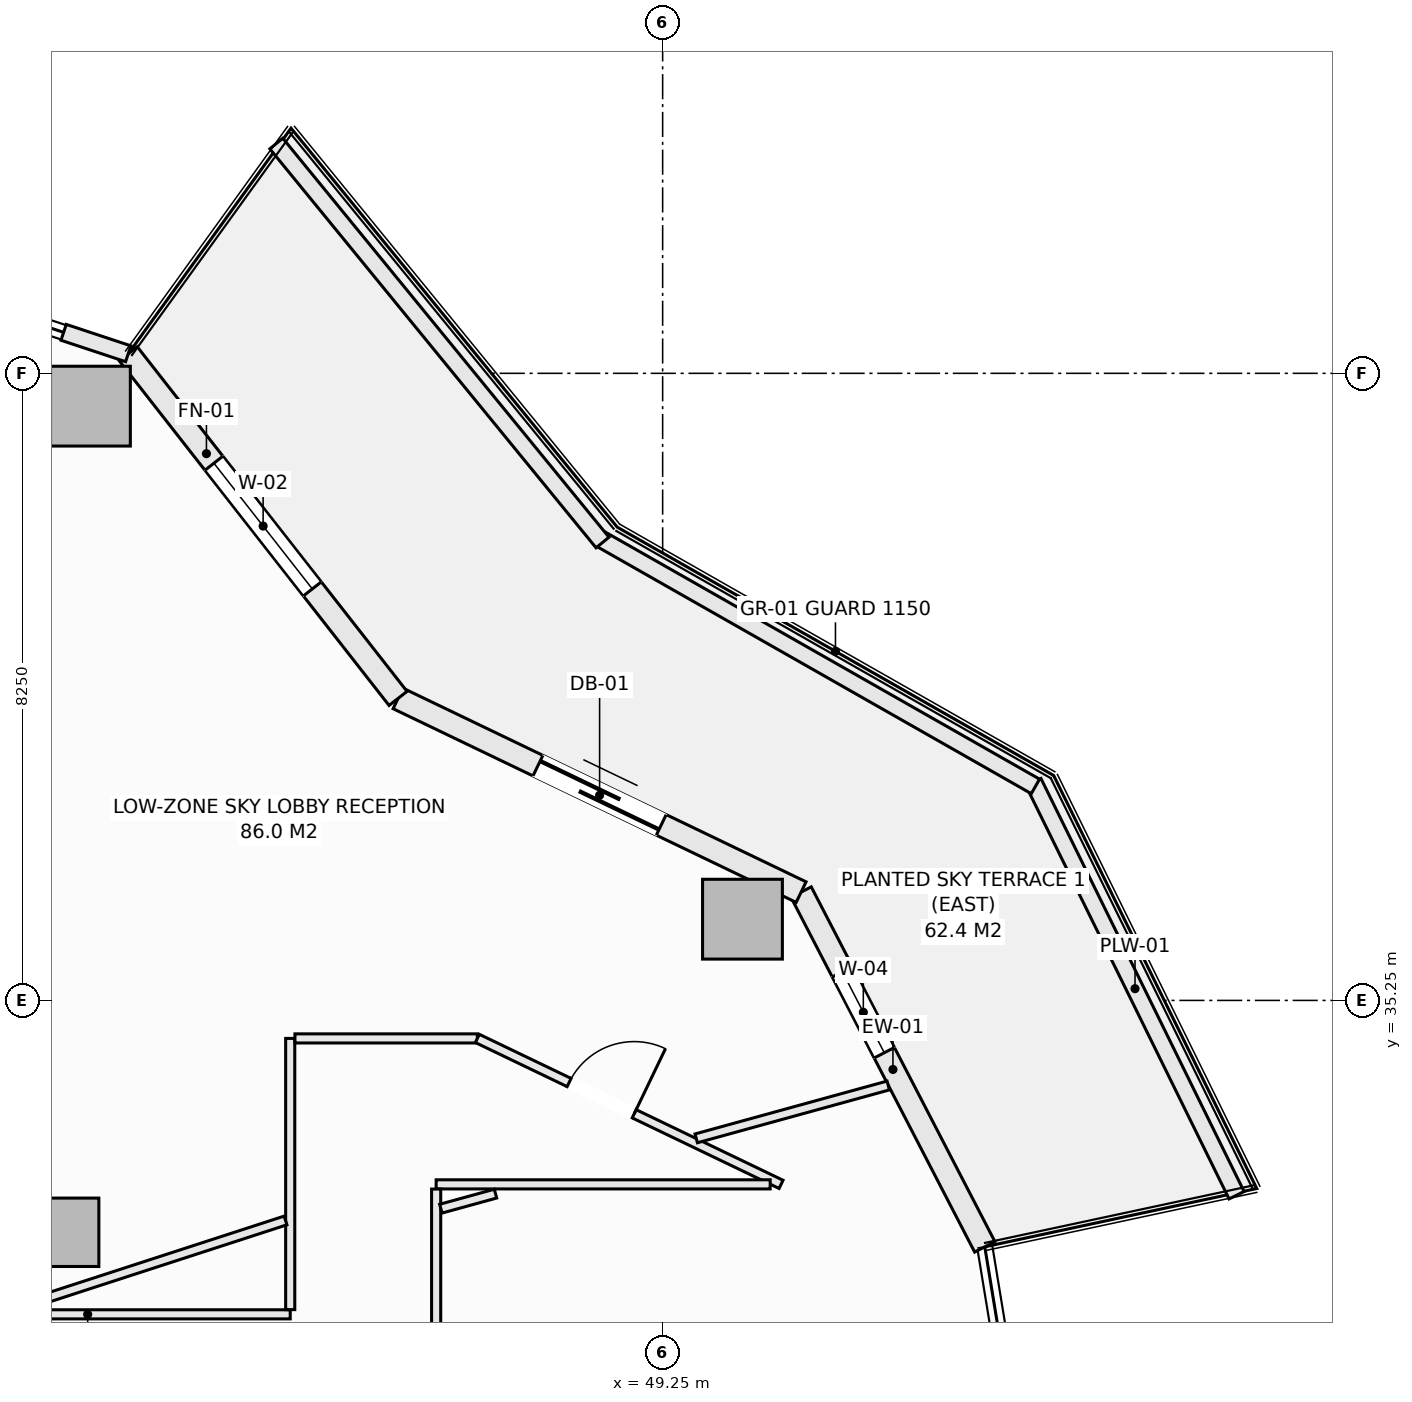
"""IFC4 building model, lengths in metres.
Left out: names, types, materials, properties, quantities, classifications, styles, units other than length and angle.
Written with IfcOpenShell. Run it as: python <this file> out.ifc"""

import sys

from ifc_helpers import new_model, si_unit, direction, frame, frame_2d, origin, origin_2d, place, context, subcontext, project, spatial, rectangle, extrude, element, fill, save


model = new_model("IFC4")
c1 = context("Model", 3, precision=1e-05, world=origin(), true_north=direction((0.0, 1.0)))
c2 = subcontext(c1, "Body", "Model", "MODEL_VIEW")
j1 = project(units=[si_unit("LENGTHUNIT", "METRE"), si_unit("PLANEANGLEUNIT", "RADIAN")], contexts=[c1])
p1 = place(None, origin())
s1 = spatial("IfcSite", under=j1, at=p1, CompositionType="ELEMENT")
p2 = place(p1, origin())
s2 = spatial("IfcBuilding", under=s1, at=p2, CompositionType="ELEMENT")
p3 = place(p2, frame((0.0, 0.0, 100.8)))
s3 = spatial("IfcBuildingStorey", under=s2, at=p3, CompositionType="ELEMENT", Elevation=100.8)
for number, where, z_axis, x_axis in (
    (1, (50.3, 36.319, -0.28), (0.0, 0.0, 1.0), (1.0, 0.0, 0.0)),
    (2, (41.721, 43.068, -0.28), (0.0, 0.0, 1.0), (1.0, 0.0, 0.0)),
):
    element("IfcColumn", number, at=place(p3, frame(where, z_axis=z_axis, x_axis=x_axis)), inside=s3, PredefinedType="COLUMN", context=c2, shape_type="SweptSolid", body=[
        extrude(rectangle(XDim=1.05, YDim=1.05, at=origin_2d()), origin(), (0.0, 0.0, 1.0), 4.51),
    ])
p4 = place(p3, frame((41.382, 32.199, -0.28), z_axis=(0.0, 0.0, 1.0), x_axis=(1.0, 0.0, 0.0)))
e3 = element("IfcColumn", 3, at=p4, inside=s3, PredefinedType="COLUMN", context=c2, shape_type="SweptSolid", body=[
    extrude(rectangle(XDim=0.9, YDim=0.9, at=origin_2d()), origin(), (0.0, 0.0, 1.0), 4.51),
])
p5 = place(p3, frame((51.072, 36.675, 0.0), z_axis=(0.0, 0.0, 1.0), x_axis=(0.459767899643, -0.888039119892, 0.0)))
e4 = element("IfcWall", 4, at=p5, inside=s3, PredefinedType="SOLIDWALL", context=c2, shape_type="SweptSolid", body=[
    extrude(rectangle(XDim=5.255, YDim=0.3, at=frame_2d((2.628, 0.0))), origin(), (0.0, 0.0, 1.0), 3.753),
])
p6 = place(p5, frame((1.18, 0.0, 0.72)))
e5 = element("IfcOpeningElement", 5, at=p6, cuts=e4, PredefinedType="OPENING", context=c2, shape_type="SweptSolid", body=[
    extrude(rectangle(XDim=1.2, YDim=1.65, at=frame_2d((0.6, 0.825))), frame((0.0, 0.16, 0.0), z_axis=(0.0, -1.0, 0.0), x_axis=(1.0, 0.0, 0.0)), (0.0, 0.0, 1.0), 0.32),
])
p7 = place(p3, frame((45.769, 39.223, 0.0), z_axis=(0.0, 0.0, 1.0), x_axis=(0.901370184739, -0.433049408339, 0.0)))
e6 = element("IfcWall", 6, at=p7, inside=s3, PredefinedType="SOLIDWALL", context=c2, shape_type="SweptSolid", body=[
    extrude(rectangle(XDim=5.884, YDim=0.3, at=frame_2d((2.942, 0.0))), origin(), (0.0, 0.0, 1.0), 3.753),
])
p8 = place(p7, frame((2.042, 0.0, 0.0)))
e7 = element("IfcOpeningElement", 7, at=p8, cuts=e6, PredefinedType="OPENING", context=c2, shape_type="SweptSolid", body=[
    extrude(rectangle(XDim=1.8, YDim=2.25, at=frame_2d((0.9, 1.125))), frame((0.0, 0.16, 0.0), z_axis=(0.0, -1.0, 0.0), x_axis=(1.0, 0.0, 0.0)), (0.0, 0.0, 1.0), 0.32),
])
p9 = place(p3, frame((42.219, 43.758, 0.0), z_axis=(0.0, 0.0, 1.0), x_axis=(0.616435134162, -0.787405693001, 0.0)))
e8 = element("IfcWall", 8, at=p9, inside=s3, PredefinedType="SOLIDWALL", context=c2, shape_type="SweptSolid", body=[
    extrude(rectangle(XDim=5.759, YDim=0.3, at=frame_2d((2.879, 0.0))), origin(), (0.0, 0.0, 1.0), 3.753),
])
p10 = place(p9, frame((1.829, 0.0, 0.74)))
e9 = element("IfcOpeningElement", 9, at=p10, cuts=e8, PredefinedType="OPENING", context=c2, shape_type="SweptSolid", body=[
    extrude(rectangle(XDim=2.1, YDim=1.7, at=frame_2d((1.05, 0.85))), frame((0.0, 0.16, 0.0), z_axis=(0.0, -1.0, 0.0), x_axis=(1.0, 0.0, 0.0)), (0.0, 0.0, 1.0), 0.32),
])
p11 = place(p3, frame((41.369, 44.039, 0.0), z_axis=(0.0, 0.0, 1.0), x_axis=(0.949227107477, -0.314591637573, 0.0)))
e10 = element("IfcWall", 10, at=p11, inside=s3, PredefinedType="SOLIDWALL", context=c2, shape_type="SweptSolid", body=[
    extrude(rectangle(XDim=0.896, YDim=0.22, at=frame_2d((0.448, 0.0))), origin(), (0.0, 0.0, 1.0), 3.753),
])
p12 = place(p3, frame((54.129, 38.122, 0.0), z_axis=(0.0, 0.0, 1.0), x_axis=(0.441269631716, -0.897374566235, 0.0)))
e11 = element("IfcWall", 11, at=p12, inside=s3, PredefinedType="PARAPET", context=c2, shape_type="SweptSolid", body=[
    extrude(rectangle(XDim=6.056, YDim=0.22, at=frame_2d((3.028, 0.0))), origin(), (0.0, 0.0, 1.0), 0.52),
])
p13 = place(p3, frame((48.413, 41.332, 0.0), z_axis=(0.0, 0.0, 1.0), x_axis=(0.869187658335, -0.494482370361, 0.0)))
e12 = element("IfcWall", 12, at=p13, inside=s3, PredefinedType="PARAPET", context=c2, shape_type="SweptSolid", body=[
    extrude(rectangle(XDim=6.606, YDim=0.22, at=frame_2d((3.303, 0.0))), origin(), (0.0, 0.0, 1.0), 0.52),
])
p14 = place(p3, frame((44.167, 46.523, 0.0), z_axis=(0.0, 0.0, 1.0), x_axis=(0.633002467947, -0.77414977593, 0.0)))
e13 = element("IfcWall", 13, at=p14, inside=s3, PredefinedType="PARAPET", context=c2, shape_type="SweptSolid", body=[
    extrude(rectangle(XDim=6.78, YDim=0.22, at=frame_2d((3.39, 0.0))), origin(), (0.0, 0.0, 1.0), 0.52),
])
p15 = place(p3, frame((39.02, 31.12, 0.0), z_axis=(0.0, 0.0, 1.0), x_axis=(1.0, 0.0, 0.0)))
e14 = element("IfcWall", 14, at=p15, inside=s3, PredefinedType="PARTITIONING", context=c2, shape_type="SweptSolid", body=[
    extrude(rectangle(XDim=5.33, YDim=0.12, at=frame_2d((2.665, 0.0))), origin(), (0.0, 0.0, 1.0), 4.23),
])
p16 = place(p3, frame((44.35, 31.182, 0.0), z_axis=(0.0, 0.0, 1.0), x_axis=(0.0, 1.0, 0.0)))
e15 = element("IfcWall", 15, at=p16, inside=s3, PredefinedType="PARTITIONING", context=c2, shape_type="SweptSolid", body=[
    extrude(rectangle(XDim=3.568, YDim=0.12, at=frame_2d((1.784, 0.0))), origin(), (0.0, 0.0, 1.0), 4.23),
])
p17 = place(p3, frame((44.412, 34.75, 0.0), z_axis=(0.0, 0.0, 1.0), x_axis=(1.0, 0.0, 0.0)))
e16 = element("IfcWall", 16, at=p17, inside=s3, PredefinedType="PARTITIONING", context=c2, shape_type="SweptSolid", body=[
    extrude(rectangle(XDim=2.4, YDim=0.12, at=frame_2d((1.2, 0.0))), origin(), (0.0, 0.0, 1.0), 3.912),
])
p18 = place(p3, frame((46.812, 34.75, 0.0), z_axis=(0.0, 0.0, 1.0), x_axis=(0.901364880585, -0.433060448492, 0.0)))
e17 = element("IfcWall", 17, at=p18, inside=s3, PredefinedType="PARTITIONING", context=c2, shape_type="SweptSolid", body=[
    extrude(rectangle(XDim=4.433, YDim=0.12, at=frame_2d((2.217, 0.0))), origin(), (0.0, 0.0, 1.0), 4.23),
])
p19 = place(p18, frame((1.34, 0.0, 0.0)))
e18 = element("IfcOpeningElement", 18, at=p19, cuts=e17, PredefinedType="OPENING", context=c2, shape_type="SweptSolid", body=[
    extrude(rectangle(XDim=0.95, YDim=2.1, at=frame_2d((0.475, 1.05))), frame((0.0, 0.07, 0.0), z_axis=(0.0, -1.0, 0.0), x_axis=(1.0, 0.0, 0.0)), (0.0, 0.0, 1.0), 0.14),
])
p20 = place(p3, frame((46.27, 32.83, 0.0), z_axis=(0.0, 0.0, 1.0), x_axis=(1.0, 0.0, 0.0)))
e19 = element("IfcWall", 19, at=p20, inside=s3, PredefinedType="PARTITIONING", context=c2, shape_type="SweptSolid", body=[
    extrude(rectangle(XDim=4.395, YDim=0.12, at=frame_2d((2.197, 0.0))), origin(), (0.0, 0.0, 1.0), 4.23),
])
p21 = place(p3, frame((46.27, 20.67, 0.0), z_axis=(0.0, 0.0, 1.0), x_axis=(0.0, 1.0, 0.0)))
e20 = element("IfcWall", 20, at=p21, inside=s3, PredefinedType="PARTITIONING", context=c2, shape_type="SweptSolid", body=[
    extrude(rectangle(XDim=12.098, YDim=0.12, at=frame_2d((6.049, 0.0))), origin(), (0.0, 0.0, 1.0), 4.23),
])
p22 = place(p21, frame((5.637, 0.0, 0.0)))
e21 = element("IfcOpeningElement", 21, at=p22, cuts=e20, PredefinedType="OPENING", context=c2, shape_type="SweptSolid", body=[
    extrude(rectangle(XDim=0.95, YDim=2.1, at=frame_2d((0.475, 1.05))), frame((0.0, 0.07, 0.0), z_axis=(0.0, -1.0, 0.0), x_axis=(1.0, 0.0, 0.0)), (0.0, 0.0, 1.0), 0.14),
])
p23 = place(p3, frame((46.332, 32.51, 0.0), z_axis=(0.0, 0.0, 1.0), x_axis=(0.964088084793, 0.265582689119, 0.0)))
e22 = element("IfcWall", 22, at=p23, inside=s3, PredefinedType="PARTITIONING", context=c2, shape_type="SweptSolid", body=[
    extrude(rectangle(XDim=0.746, YDim=0.12, at=frame_2d((0.373, 0.0))), origin(), (0.0, 0.0, 1.0), 4.23),
])
p24 = place(p3, frame((49.692, 33.435, 0.0), z_axis=(0.0, 0.0, 1.0), x_axis=(0.964126743029, 0.265442316476, 0.0)))
e23 = element("IfcWall", 23, at=p24, inside=s3, PredefinedType="PARTITIONING", context=c2, shape_type="SweptSolid", body=[
    extrude(rectangle(XDim=2.62, YDim=0.12, at=frame_2d((1.31, 0.0))), origin(), (0.0, 0.0, 1.0), 4.23),
])
p25 = place(p3, frame((40.862, 31.242, 0.0), z_axis=(0.0, 0.0, 1.0), x_axis=(0.951081366657, 0.308940502358, 0.0)))
e24 = element("IfcWall", 24, at=p25, inside=s3, PredefinedType="PARTITIONING", context=c2, shape_type="SweptSolid", body=[
    extrude(rectangle(XDim=3.603, YDim=0.12, at=frame_2d((1.801, 0.0))), origin(), (0.0, 0.0, 1.0), 4.23),
])
p26 = place(p6, origin())
e25 = element("IfcWindow", 25, at=p26, inside=s3, PartitioningType="SINGLE_PANEL", PredefinedType="WINDOW", context=c2, shape_type="SweptSolid", body=[
    extrude(rectangle(XDim=1.2, YDim=1.65, at=frame_2d((0.6, 0.825))), frame((0.0, 0.03, 0.0), z_axis=(0.0, -1.0, 0.0), x_axis=(1.0, 0.0, 0.0)), (0.0, 0.0, 1.0), 0.06),
])
fill(e5, e25)
p27 = place(p8, origin())
e26 = element("IfcDoor", 26, at=p27, inside=s3, OperationType="SLIDING_TO_LEFT", PredefinedType="DOOR", context=c2, shape_type="SweptSolid", body=[
    extrude(rectangle(XDim=1.8, YDim=2.25, at=frame_2d((0.9, 1.125))), frame((0.0, 0.025, 0.0), z_axis=(0.0, -1.0, 0.0), x_axis=(1.0, 0.0, 0.0)), (0.0, 0.0, 1.0), 0.05),
])
fill(e7, e26)
p28 = place(p10, origin())
e27 = element("IfcWindow", 27, at=p28, inside=s3, PartitioningType="SINGLE_PANEL", PredefinedType="WINDOW", context=c2, shape_type="SweptSolid", body=[
    extrude(rectangle(XDim=2.1, YDim=1.7, at=frame_2d((1.05, 0.85))), frame((0.0, 0.03, 0.0), z_axis=(0.0, -1.0, 0.0), x_axis=(1.0, 0.0, 0.0)), (0.0, 0.0, 1.0), 0.06),
])
fill(e9, e27)
p29 = place(p19, origin())
e28 = element("IfcDoor", 28, at=p29, inside=s3, OperationType="SINGLE_SWING_RIGHT", PredefinedType="DOOR", context=c2, shape_type="SweptSolid", body=[
    extrude(rectangle(XDim=0.95, YDim=2.1, at=frame_2d((0.475, 1.05))), frame((0.0, 0.025, 0.0), z_axis=(0.0, -1.0, 0.0), x_axis=(1.0, 0.0, 0.0)), (0.0, 0.0, 1.0), 0.05),
])
fill(e18, e28)
save(model, sys.argv[1])
